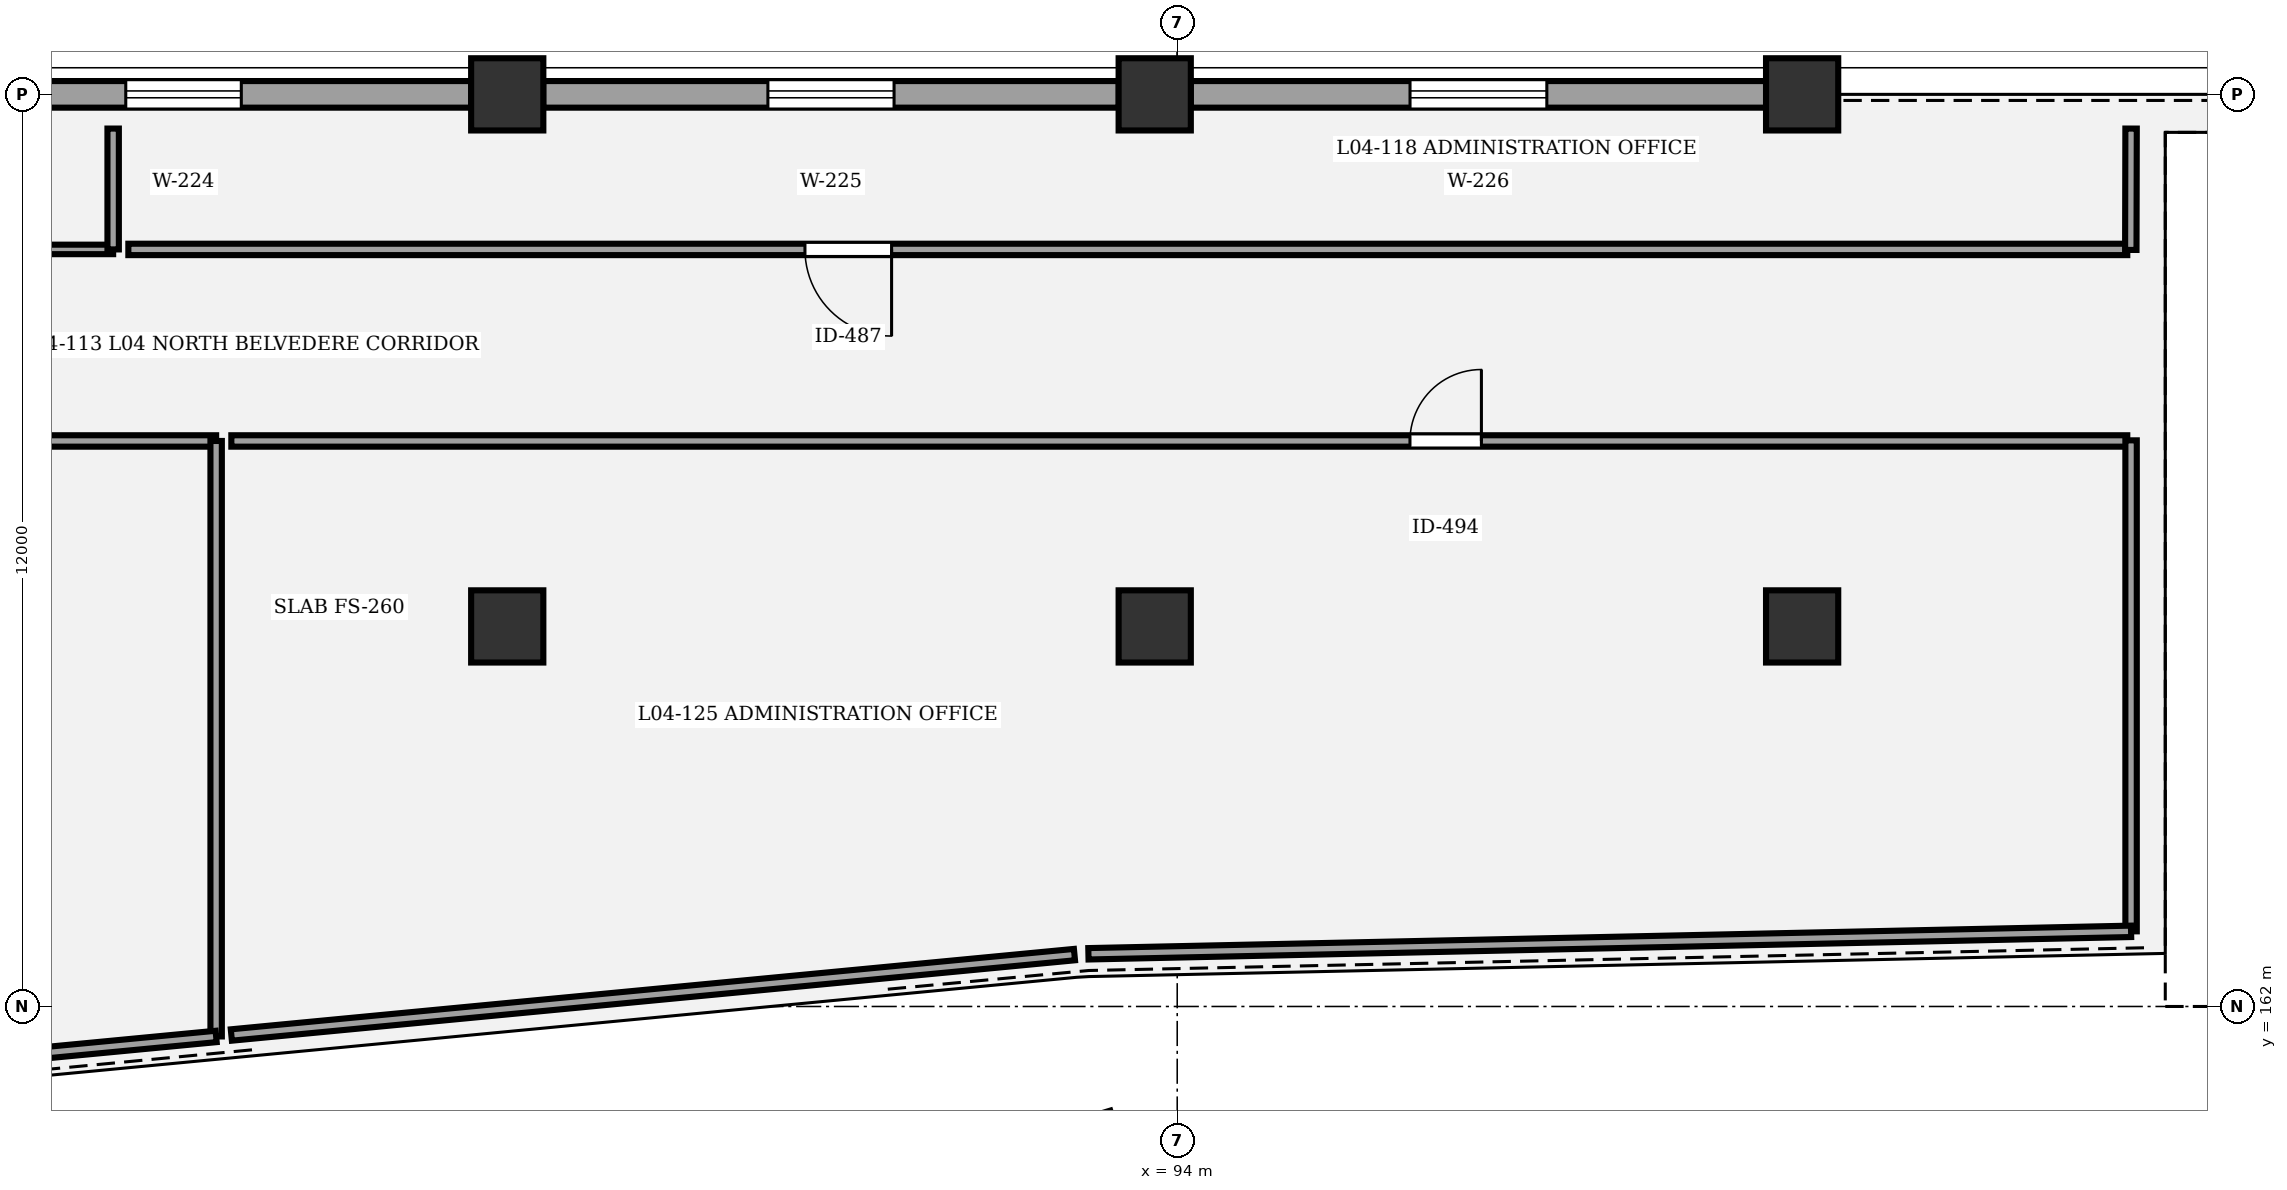
"""IFC4 building model, lengths in metres.
Left out: names, types, materials, properties, quantities, classifications, styles, units other than length and angle.
Written with IfcOpenShell. Run it as: python <this file> out.ifc"""

import sys

from ifc_helpers import new_model, si_unit, direction, frame, frame_2d, origin, origin_2d, place, context, subcontext, project, spatial, rectangle, circle, extrude, element, fill, save


model = new_model("IFC4")
c1 = context("Model", 3, precision=1e-05, world=origin(), true_north=direction((0.0, 1.0)))
c2 = subcontext(c1, "Body", "Model", "MODEL_VIEW")
j1 = project(units=[si_unit("LENGTHUNIT", "METRE"), si_unit("PLANEANGLEUNIT", "RADIAN")], contexts=[c1])
p1 = place(None, origin())
s1 = spatial("IfcSite", under=j1, at=p1, CompositionType="ELEMENT")
p2 = place(p1, origin())
s2 = spatial("IfcBuilding", under=s1, at=p2, CompositionType="ELEMENT")
p3 = place(p2, frame((0.0, 0.0, 19.2)))
s3 = spatial("IfcBuildingStorey", under=s2, at=p3, CompositionType="ELEMENT", Elevation=19.2)
p4 = place(p3, frame((92.885, 160.194, 0.0), z_axis=(0.0, 0.0, 1.0), x_axis=(-0.289198876314, 0.957269037387, 0.0)))
e1 = element("IfcColumn", 1, at=p4, inside=s3, PredefinedType="COLUMN", context=c2, shape_type="SweptSolid", body=[
    extrude(rectangle(XDim=0.7, YDim=0.7, at=origin_2d()), origin(), (0.0, 0.0, 1.0), 4.8),
])
for number, where, z_axis, x_axis in (
    (2, (85.185, 167.0, 0.0), (0.0, 0.0, 1.0), (1.0, 0.0, 0.0)),
    (3, (85.185, 174.0, 0.0), (0.0, 0.0, 1.0), (1.0, 0.0, 0.0)),
    (4, (93.704, 167.0, 0.0), (0.0, 0.0, 1.0), (1.0, 0.0, 0.0)),
    (5, (93.704, 174.0, 0.0), (0.0, 0.0, 1.0), (1.0, 0.0, 0.0)),
    (6, (102.222, 167.0, 0.0), (0.0, 0.0, 1.0), (1.0, 0.0, 0.0)),
    (7, (102.222, 174.0, 0.0), (0.0, 0.0, 1.0), (1.0, 0.0, 0.0)),
):
    element("IfcColumn", number, at=place(p3, frame(where, z_axis=z_axis, x_axis=x_axis)), inside=s3, PredefinedType="COLUMN", context=c2, shape_type="SweptSolid", body=[
        extrude(circle(Radius=0.475, at=origin_2d()), origin(), (0.0, 0.0, 1.0), 4.8),
    ])
p5 = place(p3, frame((77.14, 174.0, 0.0), z_axis=(0.0, 0.0, 1.0), x_axis=(1.0, 0.0, 0.0)))
e8 = element("IfcWall", 8, at=p5, inside=s3, PredefinedType="STANDARD", context=c2, shape_type="SweptSolid", body=[
    extrude(rectangle(XDim=7.572, YDim=0.35, at=frame_2d((3.786, 0.0))), origin(), (0.0, 0.0, 1.0), 3.56),
])
p6 = place(p5, frame((3.026, 0.0, 0.9)))
e9 = element("IfcOpeningElement", 9, at=p6, cuts=e8, PredefinedType="OPENING", context=c2, shape_type="SweptSolid", body=[
    extrude(rectangle(XDim=1.52, YDim=1.55, at=frame_2d((0.76, 0.775))), frame((0.0, 0.185, 0.0), z_axis=(0.0, -1.0, 0.0), x_axis=(1.0, 0.0, 0.0)), (0.0, 0.0, 1.0), 0.37),
])
p7 = place(p3, frame((85.658, 174.0, 0.0), z_axis=(0.0, 0.0, 1.0), x_axis=(1.0, 0.0, 0.0)))
e10 = element("IfcWall", 10, at=p7, inside=s3, PredefinedType="STANDARD", context=c2, shape_type="SweptSolid", body=[
    extrude(rectangle(XDim=7.573, YDim=0.35, at=frame_2d((3.787, 0.0))), origin(), (0.0, 0.0, 1.0), 3.56),
])
p8 = place(p7, frame((2.957, 0.0, 0.9)))
e11 = element("IfcOpeningElement", 11, at=p8, cuts=e10, PredefinedType="OPENING", context=c2, shape_type="SweptSolid", body=[
    extrude(rectangle(XDim=1.66, YDim=1.55, at=frame_2d((0.83, 0.775))), frame((0.0, 0.185, 0.0), z_axis=(0.0, -1.0, 0.0), x_axis=(1.0, 0.0, 0.0)), (0.0, 0.0, 1.0), 0.37),
])
p9 = place(p3, frame((94.177, 174.0, 0.0), z_axis=(0.0, 0.0, 1.0), x_axis=(1.0, 0.0, 0.0)))
e12 = element("IfcWall", 12, at=p9, inside=s3, PredefinedType="STANDARD", context=c2, shape_type="SweptSolid", body=[
    extrude(rectangle(XDim=7.572, YDim=0.35, at=frame_2d((3.786, 0.0))), origin(), (0.0, 0.0, 1.0), 3.56),
])
p10 = place(p9, frame((2.886, 0.0, 0.9)))
e13 = element("IfcOpeningElement", 13, at=p10, cuts=e12, PredefinedType="OPENING", context=c2, shape_type="SweptSolid", body=[
    extrude(rectangle(XDim=1.8, YDim=1.55, at=frame_2d((0.9, 0.775))), frame((0.0, 0.185, 0.0), z_axis=(0.0, -1.0, 0.0), x_axis=(1.0, 0.0, 0.0)), (0.0, 0.0, 1.0), 0.37),
])
p11 = place(p3, frame((80.0, 171.96, 0.0), z_axis=(0.0, 0.0, 1.0), x_axis=(-1.0, 0.0, 0.0)))
e14 = element("IfcWall", 14, at=p11, inside=s3, PredefinedType="PARTITIONING", context=c2, shape_type="SweptSolid", body=[
    extrude(rectangle(XDim=26.1, YDim=0.125, at=frame_2d((13.05, 0.0))), origin(), (0.0, 0.0, 1.0), 3.55),
])
p12 = place(p11, frame((16.154, 0.0, 0.0)))
e15 = element("IfcOpeningElement", 15, at=p12, cuts=e14, PredefinedType="OPENING", context=c2, shape_type="SweptSolid", body=[
    extrude(rectangle(XDim=1.1, YDim=2.2, at=frame_2d((0.55, 1.1))), frame((0.0, 0.073, 0.0), z_axis=(0.0, -1.0, 0.0), x_axis=(1.0, 0.0, 0.0)), (0.0, 0.0, 1.0), 0.145),
])
p13 = place(p3, frame((106.5, 171.96, 0.0), z_axis=(0.0, 0.0, 1.0), x_axis=(-1.0, 0.0, 0.0)))
e16 = element("IfcWall", 16, at=p13, inside=s3, PredefinedType="PARTITIONING", context=c2, shape_type="SweptSolid", body=[
    extrude(rectangle(XDim=26.3, YDim=0.15, at=frame_2d((13.15, 0.0))), origin(), (0.0, 0.0, 1.0), 3.55),
])
p14 = place(p13, frame((16.258, 0.0, 0.0)))
e17 = element("IfcOpeningElement", 17, at=p14, cuts=e16, PredefinedType="OPENING", context=c2, shape_type="SweptSolid", body=[
    extrude(rectangle(XDim=1.14, YDim=2.2, at=frame_2d((0.57, 1.1))), frame((0.0, 0.085, 0.0), z_axis=(0.0, -1.0, 0.0), x_axis=(1.0, 0.0, 0.0)), (0.0, 0.0, 1.0), 0.17),
])
p15 = place(p3, frame((56.36, 169.44, 0.0), z_axis=(0.0, 0.0, 1.0), x_axis=(1.0, 0.0, 0.0)))
e18 = element("IfcWall", 18, at=p15, inside=s3, PredefinedType="PARTITIONING", context=c2, shape_type="SweptSolid", body=[
    extrude(rectangle(XDim=24.995, YDim=0.15, at=frame_2d((12.498, 0.0))), origin(), (0.0, 0.0, 1.0), 3.55),
])
p16 = place(p15, frame((15.566, 0.0, 0.0)))
e19 = element("IfcOpeningElement", 19, at=p16, cuts=e18, PredefinedType="OPENING", context=c2, shape_type="SweptSolid", body=[
    extrude(rectangle(XDim=0.9, YDim=2.3, at=frame_2d((0.45, 1.15))), frame((0.0, 0.085, 0.0), z_axis=(0.0, -1.0, 0.0), x_axis=(1.0, 0.0, 0.0)), (0.0, 0.0, 1.0), 0.17),
])
p17 = place(p3, frame((81.555, 169.44, 0.0), z_axis=(0.0, 0.0, 1.0), x_axis=(1.0, 0.0, 0.0)))
e20 = element("IfcWall", 20, at=p17, inside=s3, PredefinedType="PARTITIONING", context=c2, shape_type="SweptSolid", body=[
    extrude(rectangle(XDim=24.945, YDim=0.15, at=frame_2d((12.473, 0.0))), origin(), (0.0, 0.0, 1.0), 3.55),
])
p18 = place(p17, frame((15.507, 0.0, 0.0)))
e21 = element("IfcOpeningElement", 21, at=p18, cuts=e20, PredefinedType="OPENING", context=c2, shape_type="SweptSolid", body=[
    extrude(rectangle(XDim=0.94, YDim=2.3, at=frame_2d((0.47, 1.15))), frame((0.0, 0.085, 0.0), z_axis=(0.0, -1.0, 0.0), x_axis=(1.0, 0.0, 0.0)), (0.0, 0.0, 1.0), 0.17),
])
p19 = place(p3, frame((80.0, 173.55, 0.0), z_axis=(0.0, 0.0, 1.0), x_axis=(0.0, -1.0, 0.0)))
e22 = element("IfcWall", 22, at=p19, inside=s3, PredefinedType="PARTITIONING", context=c2, shape_type="SweptSolid", body=[
    extrude(rectangle(XDim=1.59, YDim=0.15, at=frame_2d((0.795, 0.0))), origin(), (0.0, 0.0, 1.0), 3.55),
])
p20 = place(p3, frame((106.55, 173.55, 0.0), z_axis=(0.0, 0.0, 1.0), x_axis=(-0.002293221305, -0.999997370565, 0.0)))
e23 = element("IfcWall", 23, at=p20, inside=s3, PredefinedType="PARTITIONING", context=c2, shape_type="SweptSolid", body=[
    extrude(rectangle(XDim=1.597, YDim=0.15, at=frame_2d((0.798, 0.0))), origin(), (0.0, 0.0, 1.0), 3.55),
])
p21 = place(p3, frame((81.355, 169.44, 0.0), z_axis=(0.0, 0.0, 1.0), x_axis=(0.0, -1.0, 0.0)))
e24 = element("IfcWall", 24, at=p21, inside=s3, PredefinedType="PARTITIONING", context=c2, shape_type="SweptSolid", body=[
    extrude(rectangle(XDim=7.834, YDim=0.15, at=frame_2d((3.917, 0.0))), origin(), (0.0, 0.0, 1.0), 3.55),
])
p22 = place(p3, frame((81.355, 161.606, 0.0), z_axis=(0.0, 0.0, 1.0), x_axis=(-0.995481155674, -0.094959300221, 0.0)))
e25 = element("IfcWall", 25, at=p22, inside=s3, PredefinedType="PARTITIONING", context=c2, shape_type="SweptSolid", body=[
    extrude(rectangle(XDim=3.682, YDim=0.15, at=frame_2d((1.841, 0.0))), origin(), (0.0, 0.0, 1.0), 3.55),
])
p23 = place(p3, frame((92.648, 162.683, 0.0), z_axis=(0.0, 0.0, 1.0), x_axis=(-0.995483944756, -0.094930057059, 0.0)))
e26 = element("IfcWall", 26, at=p23, inside=s3, PredefinedType="PARTITIONING", context=c2, shape_type="SweptSolid", body=[
    extrude(rectangle(XDim=11.144, YDim=0.15, at=frame_2d((5.572, 0.0))), origin(), (0.0, 0.0, 1.0), 3.55),
])
p24 = place(p3, frame((106.55, 169.448, 0.0), z_axis=(0.0, 0.0, 1.0), x_axis=(0.0, -1.0, 0.0)))
e27 = element("IfcWall", 27, at=p24, inside=s3, PredefinedType="PARTITIONING", context=c2, shape_type="SweptSolid", body=[
    extrude(rectangle(XDim=6.46, YDim=0.15, at=frame_2d((3.23, 0.0))), origin(), (0.0, 0.0, 1.0), 3.55),
])
p25 = place(p3, frame((106.55, 162.989, 0.0), z_axis=(0.0, 0.0, 1.0), x_axis=(-0.999768230535, -0.021528706714, 0.0)))
e28 = element("IfcWall", 28, at=p25, inside=s3, PredefinedType="PARTITIONING", context=c2, shape_type="SweptSolid", body=[
    extrude(rectangle(XDim=13.722, YDim=0.15, at=frame_2d((6.861, 0.0))), origin(), (0.0, 0.0, 1.0), 3.55),
])
p26 = place(p6, origin())
e29 = element("IfcWindow", 29, at=p26, inside=s3, PartitioningType="SINGLE_PANEL", PredefinedType="WINDOW", context=c2, shape_type="SweptSolid", body=[
    extrude(rectangle(XDim=1.52, YDim=1.55, at=frame_2d((0.76, 0.775))), frame((0.0, 0.03, 0.0), z_axis=(0.0, -1.0, 0.0), x_axis=(1.0, 0.0, 0.0)), (0.0, 0.0, 1.0), 0.06),
])
fill(e9, e29)
p27 = place(p8, origin())
e30 = element("IfcWindow", 30, at=p27, inside=s3, PartitioningType="SINGLE_PANEL", PredefinedType="WINDOW", context=c2, shape_type="SweptSolid", body=[
    extrude(rectangle(XDim=1.66, YDim=1.55, at=frame_2d((0.83, 0.775))), frame((0.0, 0.03, 0.0), z_axis=(0.0, -1.0, 0.0), x_axis=(1.0, 0.0, 0.0)), (0.0, 0.0, 1.0), 0.06),
])
fill(e11, e30)
p28 = place(p10, origin())
e31 = element("IfcWindow", 31, at=p28, inside=s3, PartitioningType="SINGLE_PANEL", PredefinedType="WINDOW", context=c2, shape_type="SweptSolid", body=[
    extrude(rectangle(XDim=1.8, YDim=1.55, at=frame_2d((0.9, 0.775))), frame((0.0, 0.03, 0.0), z_axis=(0.0, -1.0, 0.0), x_axis=(1.0, 0.0, 0.0)), (0.0, 0.0, 1.0), 0.06),
])
fill(e13, e31)
p29 = place(p14, origin())
e32 = element("IfcDoor", 32, at=p29, inside=s3, OperationType="SINGLE_SWING_LEFT", PredefinedType="DOOR", context=c2, shape_type="SweptSolid", body=[
    extrude(rectangle(XDim=1.14, YDim=2.2, at=frame_2d((0.57, 1.1))), frame((0.0, 0.025, 0.0), z_axis=(0.0, -1.0, 0.0), x_axis=(1.0, 0.0, 0.0)), (0.0, 0.0, 1.0), 0.05),
])
fill(e17, e32)
p30 = place(p18, origin())
e33 = element("IfcDoor", 33, at=p30, inside=s3, OperationType="SINGLE_SWING_RIGHT", PredefinedType="DOOR", context=c2, shape_type="SweptSolid", body=[
    extrude(rectangle(XDim=0.94, YDim=2.3, at=frame_2d((0.47, 1.15))), frame((0.0, 0.025, 0.0), z_axis=(0.0, -1.0, 0.0), x_axis=(1.0, 0.0, 0.0)), (0.0, 0.0, 1.0), 0.05),
])
fill(e21, e33)
save(model, sys.argv[1])
